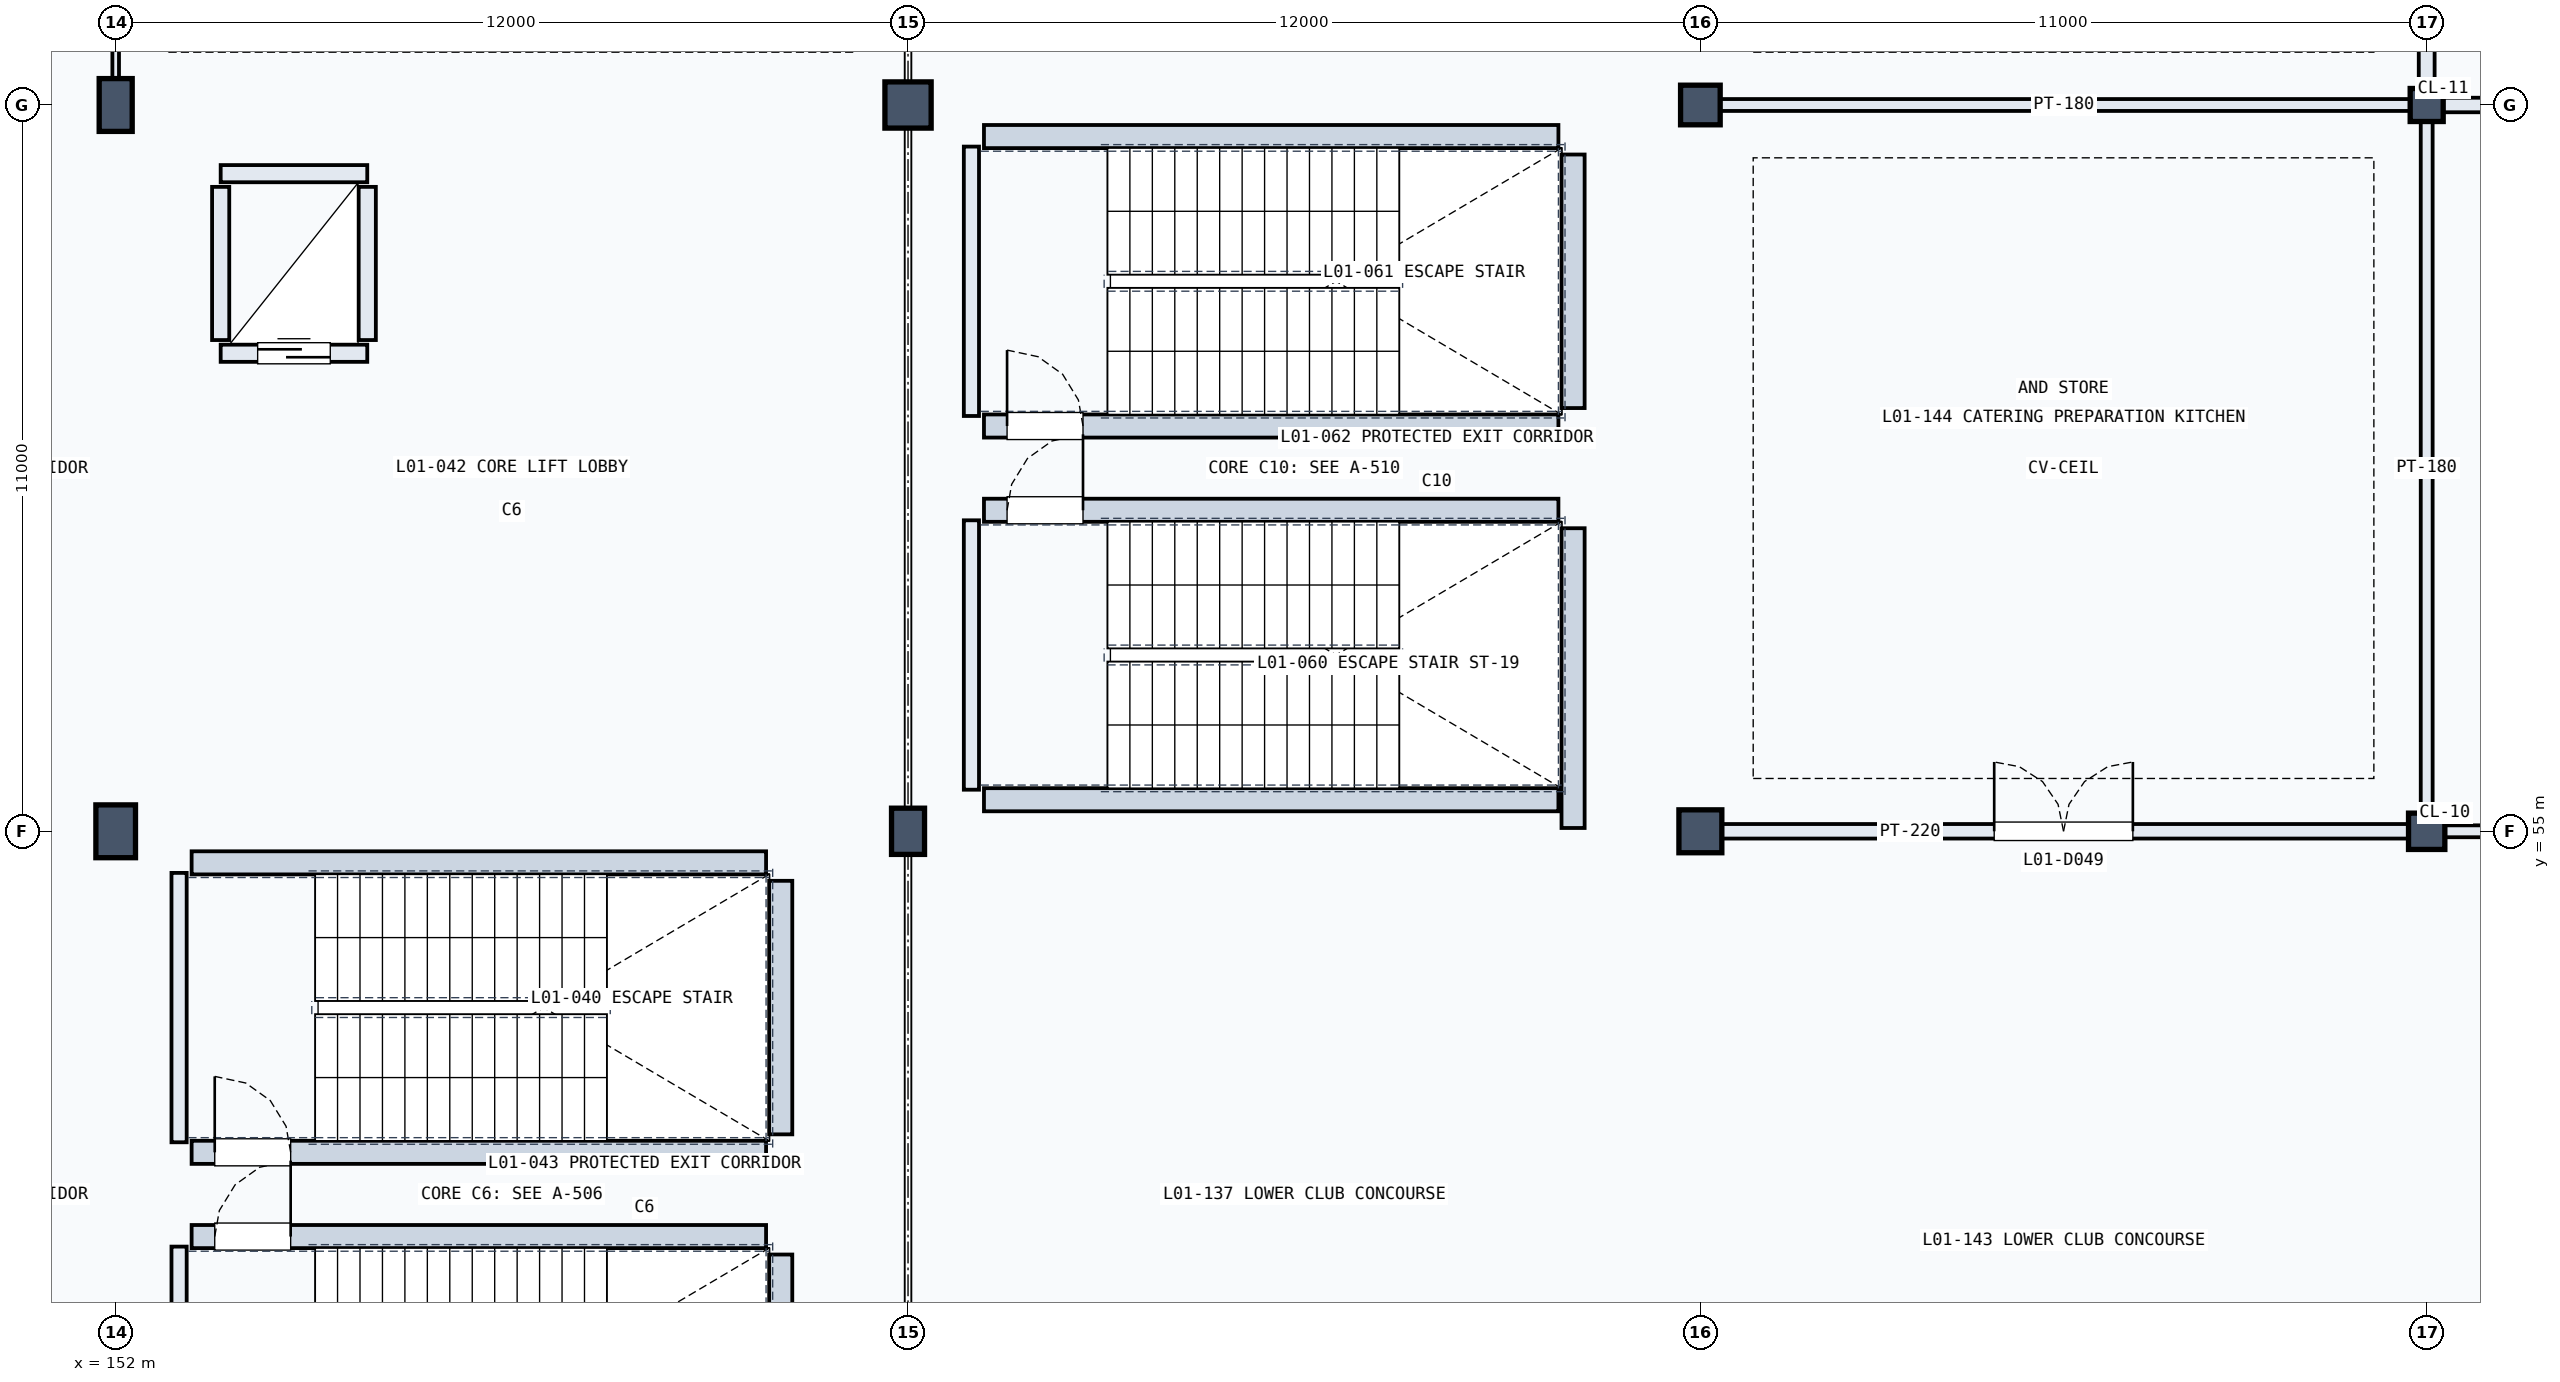
"""IFC4 building model, lengths in metres.
Left out: names, types, materials, properties, quantities, classifications, styles, units other than length and angle.
Written with IfcOpenShell. Run it as: python <this file> out.ifc"""

import sys

from ifc_helpers import new_model, si_unit, direction, frame, frame_2d, origin, origin_2d, place, context, subcontext, project, spatial, rectangle, extrude, element, fill, save


model = new_model("IFC4")
c1 = context("Model", 3, precision=1e-05, world=origin(), true_north=direction((0.0, 1.0)))
c2 = subcontext(c1, "Body", "Model", "MODEL_VIEW")
j1 = project(units=[si_unit("LENGTHUNIT", "METRE"), si_unit("PLANEANGLEUNIT", "RADIAN")], contexts=[c1])
p1 = place(None, origin())
s1 = spatial("IfcSite", under=j1, at=p1, CompositionType="ELEMENT")
p2 = place(p1, origin())
s2 = spatial("IfcBuilding", under=s1, at=p2, CompositionType="ELEMENT")
p3 = place(p2, frame((0.0, 0.0, 5.4)))
s3 = spatial("IfcBuildingStorey", under=s2, at=p3, CompositionType="ELEMENT", Elevation=5.4)
p4 = place(p3, frame((152.0, 55.0, 0.0), z_axis=(0.0, 0.0, 1.0), x_axis=(1.0, 0.0, 0.0)))
e1 = element("IfcColumn", 1, at=p4, inside=s3, PredefinedType="COLUMN", context=c2, shape_type="SweptSolid", body=[
    extrude(rectangle(XDim=0.6, YDim=0.8, at=origin_2d()), origin(), (0.0, 0.0, 1.0), 4.8),
])
p5 = place(p3, frame((152.0, 66.0, 0.0), z_axis=(0.0, 0.0, 1.0), x_axis=(1.0, 0.0, 0.0)))
e2 = element("IfcColumn", 2, at=p5, inside=s3, PredefinedType="COLUMN", context=c2, shape_type="SweptSolid", body=[
    extrude(rectangle(XDim=0.5, YDim=0.8, at=origin_2d()), origin(), (0.0, 0.0, 1.0), 4.8),
])
p6 = place(p3, frame((164.0, 55.0, 0.0), z_axis=(0.0, 0.0, 1.0), x_axis=(1.0, 0.0, 0.0)))
e3 = element("IfcColumn", 3, at=p6, inside=s3, PredefinedType="COLUMN", context=c2, shape_type="SweptSolid", body=[
    extrude(rectangle(XDim=0.5, YDim=0.7, at=origin_2d()), origin(), (0.0, 0.0, 1.0), 4.8),
])
p7 = place(p3, frame((164.0, 66.0, 0.0), z_axis=(0.0, 0.0, 1.0), x_axis=(1.0, 0.0, 0.0)))
e4 = element("IfcColumn", 4, at=p7, inside=s3, PredefinedType="COLUMN", context=c2, shape_type="SweptSolid", body=[
    extrude(rectangle(XDim=0.7, YDim=0.7, at=origin_2d()), origin(), (0.0, 0.0, 1.0), 4.8),
])
p8 = place(p3, frame((176.0, 55.0, 0.0), z_axis=(0.0, 0.0, 1.0), x_axis=(1.0, 0.0, 0.0)))
e5 = element("IfcColumn", 5, at=p8, inside=s3, PredefinedType="COLUMN", context=c2, shape_type="SweptSolid", body=[
    extrude(rectangle(XDim=0.65, YDim=0.65, at=origin_2d()), origin(), (0.0, 0.0, 1.0), 4.8),
])
p9 = place(p3, frame((176.0, 66.0, 0.0), z_axis=(0.0, 0.0, 1.0), x_axis=(1.0, 0.0, 0.0)))
e6 = element("IfcColumn", 6, at=p9, inside=s3, PredefinedType="COLUMN", context=c2, shape_type="SweptSolid", body=[
    extrude(rectangle(XDim=0.6, YDim=0.6, at=origin_2d()), origin(), (0.0, 0.0, 1.0), 4.8),
])
p10 = place(p3, frame((187.0, 55.0, 0.0), z_axis=(0.0, 0.0, 1.0), x_axis=(1.0, 0.0, 0.0)))
e7 = element("IfcColumn", 7, at=p10, inside=s3, PredefinedType="COLUMN", context=c2, shape_type="SweptSolid", body=[
    extrude(rectangle(XDim=0.55, YDim=0.55, at=origin_2d()), origin(), (0.0, 0.0, 1.0), 4.8),
])
p11 = place(p3, frame((187.0, 66.0, 0.0), z_axis=(0.0, 0.0, 1.0), x_axis=(1.0, 0.0, 0.0)))
e8 = element("IfcColumn", 8, at=p11, inside=s3, PredefinedType="COLUMN", context=c2, shape_type="SweptSolid", body=[
    extrude(rectangle(XDim=0.5, YDim=0.5, at=origin_2d()), origin(), (0.0, 0.0, 1.0), 4.8),
])
p12 = place(p3, frame((152.96, 44.63, 0.0), z_axis=(0.0, 0.0, 1.0), x_axis=(0.0, 1.0, 0.0)))
e9 = element("IfcWall", 9, at=p12, inside=s3, PredefinedType="SOLIDWALL", context=c2, shape_type="SweptSolid", body=[
    extrude(rectangle(XDim=4.08, YDim=0.23, at=frame_2d((2.04, 0.0))), origin(), (0.0, 0.0, 1.0), 4.46),
])
p13 = place(p3, frame((162.072, 44.05, 0.0), z_axis=(0.0, 0.0, 1.0), x_axis=(0.0, 1.0, 0.0)))
e10 = element("IfcWall", 10, at=p13, inside=s3, PredefinedType="SOLIDWALL", context=c2, shape_type="SweptSolid", body=[
    extrude(rectangle(XDim=4.54, YDim=0.35, at=frame_2d((2.27, 0.0))), origin(), (0.0, 0.0, 1.0), 4.46),
])
p14 = place(p3, frame((153.15, 48.862, 0.0), z_axis=(0.0, 0.0, 1.0), x_axis=(1.0, 0.0, 0.0)))
e11 = element("IfcWall", 11, at=p14, inside=s3, PredefinedType="SOLIDWALL", context=c2, shape_type="SweptSolid", body=[
    extrude(rectangle(XDim=8.7, YDim=0.35, at=frame_2d((4.35, 0.0))), origin(), (0.0, 0.0, 1.0), 4.46),
])
p15 = place(p14, frame((0.35, 0.0, 0.0)))
e12 = element("IfcOpeningElement", 12, at=p15, cuts=e11, PredefinedType="OPENING", context=c2, shape_type="SweptSolid", body=[
    extrude(rectangle(XDim=1.15, YDim=2.2, at=frame_2d((0.575, 1.1))), frame((0.0, 0.185, 0.0), z_axis=(0.0, -1.0, 0.0), x_axis=(1.0, 0.0, 0.0)), (0.0, 0.0, 1.0), 0.37),
])
p16 = place(p3, frame((152.96, 50.29, 0.0), z_axis=(0.0, 0.0, 1.0), x_axis=(0.0, 1.0, 0.0)))
e13 = element("IfcWall", 13, at=p16, inside=s3, PredefinedType="SOLIDWALL", context=c2, shape_type="SweptSolid", body=[
    extrude(rectangle(XDim=4.08, YDim=0.23, at=frame_2d((2.04, 0.0))), origin(), (0.0, 0.0, 1.0), 4.46),
])
p17 = place(p3, frame((162.072, 50.41, 0.0), z_axis=(0.0, 0.0, 1.0), x_axis=(0.0, 1.0, 0.0)))
e14 = element("IfcWall", 14, at=p17, inside=s3, PredefinedType="SOLIDWALL", context=c2, shape_type="SweptSolid", body=[
    extrude(rectangle(XDim=3.84, YDim=0.35, at=frame_2d((1.92, 0.0))), origin(), (0.0, 0.0, 1.0), 4.46),
])
p18 = place(p3, frame((153.15, 50.138, 0.0), z_axis=(0.0, 0.0, 1.0), x_axis=(1.0, 0.0, 0.0)))
e15 = element("IfcWall", 15, at=p18, inside=s3, PredefinedType="SOLIDWALL", context=c2, shape_type="SweptSolid", body=[
    extrude(rectangle(XDim=8.7, YDim=0.35, at=frame_2d((4.35, 0.0))), origin(), (0.0, 0.0, 1.0), 4.46),
])
p19 = place(p18, frame((0.35, 0.0, 0.0)))
e16 = element("IfcOpeningElement", 16, at=p19, cuts=e15, PredefinedType="OPENING", context=c2, shape_type="SweptSolid", body=[
    extrude(rectangle(XDim=1.15, YDim=2.2, at=frame_2d((0.575, 1.1))), frame((0.0, 0.185, 0.0), z_axis=(0.0, -1.0, 0.0), x_axis=(1.0, 0.0, 0.0)), (0.0, 0.0, 1.0), 0.37),
])
p20 = place(p3, frame((153.15, 54.522, 0.0), z_axis=(0.0, 0.0, 1.0), x_axis=(1.0, 0.0, 0.0)))
e17 = element("IfcWall", 17, at=p20, inside=s3, PredefinedType="SOLIDWALL", context=c2, shape_type="SweptSolid", body=[
    extrude(rectangle(XDim=8.7, YDim=0.35, at=frame_2d((4.35, 0.0))), origin(), (0.0, 0.0, 1.0), 4.46),
])
p21 = place(p3, frame((153.59, 62.24, 0.0), z_axis=(0.0, 0.0, 1.0), x_axis=(1.0, 0.0, 0.0)))
e18 = element("IfcWall", 18, at=p21, inside=s3, PredefinedType="SOLIDWALL", context=c2, shape_type="SweptSolid", body=[
    extrude(rectangle(XDim=2.22, YDim=0.26, at=frame_2d((1.11, 0.0))), origin(), (0.0, 0.0, 1.0), 4.46),
])
p22 = place(p21, frame((0.56, 0.0, 0.0)))
e19 = element("IfcOpeningElement", 19, at=p22, cuts=e18, PredefinedType="OPENING", context=c2, shape_type="SweptSolid", body=[
    extrude(rectangle(XDim=1.1, YDim=2.15, at=frame_2d((0.55, 1.075))), frame((0.0, 0.14, 0.0), z_axis=(0.0, -1.0, 0.0), x_axis=(1.0, 0.0, 0.0)), (0.0, 0.0, 1.0), 0.28),
])
p23 = place(p3, frame((153.59, 64.96, 0.0), z_axis=(0.0, 0.0, 1.0), x_axis=(1.0, 0.0, 0.0)))
e20 = element("IfcWall", 20, at=p23, inside=s3, PredefinedType="SOLIDWALL", context=c2, shape_type="SweptSolid", body=[
    extrude(rectangle(XDim=2.22, YDim=0.26, at=frame_2d((1.11, 0.0))), origin(), (0.0, 0.0, 1.0), 4.46),
])
for number, where, z_axis, x_axis in (
    (21, (153.59, 62.44, 0.0), (0.0, 0.0, 1.0), (0.0, 1.0, 0.0)),
    (22, (155.81, 62.44, 0.0), (0.0, 0.0, 1.0), (0.0, 1.0, 0.0)),
):
    element("IfcWall", number, at=place(p3, frame(where, z_axis=z_axis, x_axis=x_axis)), inside=s3, PredefinedType="SOLIDWALL", context=c2, shape_type="SweptSolid", body=[
        extrude(rectangle(XDim=2.32, YDim=0.26, at=frame_2d((1.16, 0.0))), origin(), (0.0, 0.0, 1.0), 4.46),
    ])
p24 = place(p3, frame((164.96, 55.63, 0.0), z_axis=(0.0, 0.0, 1.0), x_axis=(0.0, 1.0, 0.0)))
e23 = element("IfcWall", 23, at=p24, inside=s3, PredefinedType="SOLIDWALL", context=c2, shape_type="SweptSolid", body=[
    extrude(rectangle(XDim=4.08, YDim=0.23, at=frame_2d((2.04, 0.0))), origin(), (0.0, 0.0, 1.0), 3.79),
])
p25 = place(p3, frame((174.072, 55.05, 0.0), z_axis=(0.0, 0.0, 1.0), x_axis=(0.0, 1.0, 0.0)))
e24 = element("IfcWall", 24, at=p25, inside=s3, PredefinedType="SOLIDWALL", context=c2, shape_type="SweptSolid", body=[
    extrude(rectangle(XDim=4.54, YDim=0.35, at=frame_2d((2.27, 0.0))), origin(), (0.0, 0.0, 1.0), 4.46),
])
p26 = place(p3, frame((165.15, 55.478, 0.0), z_axis=(0.0, 0.0, 1.0), x_axis=(1.0, 0.0, 0.0)))
e25 = element("IfcWall", 25, at=p26, inside=s3, PredefinedType="SOLIDWALL", context=c2, shape_type="SweptSolid", body=[
    extrude(rectangle(XDim=8.7, YDim=0.35, at=frame_2d((4.35, 0.0))), origin(), (0.0, 0.0, 1.0), 4.46),
])
p27 = place(p3, frame((165.15, 59.862, 0.0), z_axis=(0.0, 0.0, 1.0), x_axis=(1.0, 0.0, 0.0)))
e26 = element("IfcWall", 26, at=p27, inside=s3, PredefinedType="SOLIDWALL", context=c2, shape_type="SweptSolid", body=[
    extrude(rectangle(XDim=8.7, YDim=0.35, at=frame_2d((4.35, 0.0))), origin(), (0.0, 0.0, 1.0), 4.46),
])
p28 = place(p27, frame((0.35, 0.0, 0.0)))
e27 = element("IfcOpeningElement", 27, at=p28, cuts=e26, PredefinedType="OPENING", context=c2, shape_type="SweptSolid", body=[
    extrude(rectangle(XDim=1.15, YDim=2.2, at=frame_2d((0.575, 1.1))), frame((0.0, 0.185, 0.0), z_axis=(0.0, -1.0, 0.0), x_axis=(1.0, 0.0, 0.0)), (0.0, 0.0, 1.0), 0.37),
])
p29 = place(p3, frame((164.96, 61.29, 0.0), z_axis=(0.0, 0.0, 1.0), x_axis=(0.0, 1.0, 0.0)))
e28 = element("IfcWall", 28, at=p29, inside=s3, PredefinedType="SOLIDWALL", context=c2, shape_type="SweptSolid", body=[
    extrude(rectangle(XDim=4.08, YDim=0.23, at=frame_2d((2.04, 0.0))), origin(), (0.0, 0.0, 1.0), 3.79),
])
p30 = place(p3, frame((174.072, 61.41, 0.0), z_axis=(0.0, 0.0, 1.0), x_axis=(0.0, 1.0, 0.0)))
e29 = element("IfcWall", 29, at=p30, inside=s3, PredefinedType="SOLIDWALL", context=c2, shape_type="SweptSolid", body=[
    extrude(rectangle(XDim=3.84, YDim=0.35, at=frame_2d((1.92, 0.0))), origin(), (0.0, 0.0, 1.0), 4.46),
])
p31 = place(p3, frame((165.15, 61.138, 0.0), z_axis=(0.0, 0.0, 1.0), x_axis=(1.0, 0.0, 0.0)))
e30 = element("IfcWall", 30, at=p31, inside=s3, PredefinedType="SOLIDWALL", context=c2, shape_type="SweptSolid", body=[
    extrude(rectangle(XDim=8.7, YDim=0.35, at=frame_2d((4.35, 0.0))), origin(), (0.0, 0.0, 1.0), 4.46),
])
p32 = place(p31, frame((0.35, 0.0, 0.0)))
e31 = element("IfcOpeningElement", 31, at=p32, cuts=e30, PredefinedType="OPENING", context=c2, shape_type="SweptSolid", body=[
    extrude(rectangle(XDim=1.15, YDim=2.2, at=frame_2d((0.575, 1.1))), frame((0.0, 0.185, 0.0), z_axis=(0.0, -1.0, 0.0), x_axis=(1.0, 0.0, 0.0)), (0.0, 0.0, 1.0), 0.37),
])
p33 = place(p3, frame((165.15, 65.522, 0.0), z_axis=(0.0, 0.0, 1.0), x_axis=(1.0, 0.0, 0.0)))
e32 = element("IfcWall", 32, at=p33, inside=s3, PredefinedType="SOLIDWALL", context=c2, shape_type="SweptSolid", body=[
    extrude(rectangle(XDim=8.7, YDim=0.35, at=frame_2d((4.35, 0.0))), origin(), (0.0, 0.0, 1.0), 4.46),
])
p34 = place(p3, frame((152.0, 66.22, 0.0), z_axis=(0.0, 0.0, 1.0), x_axis=(0.0, 1.0, 0.0)))
e33 = element("IfcWall", 33, at=p34, inside=s3, PredefinedType="PARTITIONING", context=c2, shape_type="SweptSolid", body=[
    extrude(rectangle(XDim=10.56, YDim=0.1, at=frame_2d((5.28, 0.0))), origin(), (0.0, 0.0, 1.0), 3.49),
])
p35 = place(p34, frame((4.305, 0.0, 0.0)))
e34 = element("IfcOpeningElement", 34, at=p35, cuts=e33, PredefinedType="OPENING", context=c2, shape_type="SweptSolid", body=[
    extrude(rectangle(XDim=1.95, YDim=2.4, at=frame_2d((0.975, 1.2))), frame((0.0, 0.06, 0.0), z_axis=(0.0, -1.0, 0.0), x_axis=(1.0, 0.0, 0.0)), (0.0, 0.0, 1.0), 0.12),
])
p36 = place(p3, frame((176.22, 55.0, 0.0), z_axis=(0.0, 0.0, 1.0), x_axis=(1.0, 0.0, 0.0)))
e35 = element("IfcWall", 35, at=p36, inside=s3, PredefinedType="PARTITIONING", context=c2, shape_type="SweptSolid", body=[
    extrude(rectangle(XDim=10.56, YDim=0.22, at=frame_2d((5.28, 0.0))), origin(), (0.0, 0.0, 1.0), 3.59),
])
p37 = place(p36, frame((4.23, 0.0, 0.0)))
e36 = element("IfcOpeningElement", 36, at=p37, cuts=e35, PredefinedType="OPENING", context=c2, shape_type="SweptSolid", body=[
    extrude(rectangle(XDim=2.1, YDim=2.2, at=frame_2d((1.05, 1.1))), frame((0.0, 0.12, 0.0), z_axis=(0.0, -1.0, 0.0), x_axis=(1.0, 0.0, 0.0)), (0.0, 0.0, 1.0), 0.24),
])
p38 = place(p3, frame((187.22, 55.0, 0.0), z_axis=(0.0, 0.0, 1.0), x_axis=(1.0, 0.0, 0.0)))
e37 = element("IfcWall", 37, at=p38, inside=s3, PredefinedType="PARTITIONING", context=c2, shape_type="SweptSolid", body=[
    extrude(rectangle(XDim=10.3, YDim=0.18, at=frame_2d((5.15, 0.0))), origin(), (0.0, 0.0, 1.0), 3.64),
])
p39 = place(p38, frame((4.225, 0.0, 0.0)))
e38 = element("IfcOpeningElement", 38, at=p39, cuts=e37, PredefinedType="OPENING", context=c2, shape_type="SweptSolid", body=[
    extrude(rectangle(XDim=1.85, YDim=2.35, at=frame_2d((0.925, 1.175))), frame((0.0, 0.1, 0.0), z_axis=(0.0, -1.0, 0.0), x_axis=(1.0, 0.0, 0.0)), (0.0, 0.0, 1.0), 0.2),
])
p40 = place(p3, frame((176.22, 66.0, 0.0), z_axis=(0.0, 0.0, 1.0), x_axis=(1.0, 0.0, 0.0)))
e39 = element("IfcWall", 39, at=p40, inside=s3, PredefinedType="PARTITIONING", context=c2, shape_type="SweptSolid", body=[
    extrude(rectangle(XDim=10.57, YDim=0.18, at=frame_2d((5.285, 0.0))), origin(), (0.0, 0.0, 1.0), 3.69),
])
p41 = place(p3, frame((187.0, 55.22, 0.0), z_axis=(0.0, 0.0, 1.0), x_axis=(0.0, 1.0, 0.0)))
e40 = element("IfcWall", 40, at=p41, inside=s3, PredefinedType="PARTITIONING", context=c2, shape_type="SweptSolid", body=[
    extrude(rectangle(XDim=10.57, YDim=0.18, at=frame_2d((5.285, 0.0))), origin(), (0.0, 0.0, 1.0), 3.64),
])
p42 = place(p3, frame((187.0, 66.21, 0.0), z_axis=(0.0, 0.0, 1.0), x_axis=(0.0, 1.0, 0.0)))
e41 = element("IfcWall", 41, at=p42, inside=s3, PredefinedType="PARTITIONING", context=c2, shape_type="SweptSolid", body=[
    extrude(rectangle(XDim=10.57, YDim=0.24, at=frame_2d((5.285, 0.0))), origin(), (0.0, 0.0, 1.0), 3.705),
])
p43 = place(p3, frame((187.21, 66.0, 0.0), z_axis=(0.0, 0.0, 1.0), x_axis=(1.0, 0.0, 0.0)))
e42 = element("IfcWall", 42, at=p43, inside=s3, PredefinedType="PARTITIONING", context=c2, shape_type="SweptSolid", body=[
    extrude(rectangle(XDim=10.31, YDim=0.22, at=frame_2d((5.155, 0.0))), origin(), (0.0, 0.0, 1.0), 3.705),
])
p44 = place(p15, origin())
e43 = element("IfcDoor", 43, at=p44, inside=s3, OperationType="SINGLE_SWING_RIGHT", PredefinedType="DOOR", context=c2, shape_type="SweptSolid", body=[
    extrude(rectangle(XDim=1.15, YDim=2.2, at=frame_2d((0.575, 1.1))), frame((0.0, 0.025, 0.0), z_axis=(0.0, -1.0, 0.0), x_axis=(1.0, 0.0, 0.0)), (0.0, 0.0, 1.0), 0.05),
])
fill(e12, e43)
p45 = place(p19, origin())
e44 = element("IfcDoor", 44, at=p45, inside=s3, OperationType="SINGLE_SWING_LEFT", PredefinedType="DOOR", context=c2, shape_type="SweptSolid", body=[
    extrude(rectangle(XDim=1.15, YDim=2.2, at=frame_2d((0.575, 1.1))), frame((0.0, 0.025, 0.0), z_axis=(0.0, -1.0, 0.0), x_axis=(1.0, 0.0, 0.0)), (0.0, 0.0, 1.0), 0.05),
])
fill(e16, e44)
p46 = place(p22, origin())
e45 = element("IfcDoor", 45, at=p46, inside=s3, OperationType="SLIDING_TO_LEFT", PredefinedType="DOOR", context=c2, shape_type="SweptSolid", body=[
    extrude(rectangle(XDim=1.1, YDim=2.15, at=frame_2d((0.55, 1.075))), frame((0.0, 0.025, 0.0), z_axis=(0.0, -1.0, 0.0), x_axis=(1.0, 0.0, 0.0)), (0.0, 0.0, 1.0), 0.05),
])
fill(e19, e45)
p47 = place(p28, origin())
e46 = element("IfcDoor", 46, at=p47, inside=s3, OperationType="SINGLE_SWING_RIGHT", PredefinedType="DOOR", context=c2, shape_type="SweptSolid", body=[
    extrude(rectangle(XDim=1.15, YDim=2.2, at=frame_2d((0.575, 1.1))), frame((0.0, 0.025, 0.0), z_axis=(0.0, -1.0, 0.0), x_axis=(1.0, 0.0, 0.0)), (0.0, 0.0, 1.0), 0.05),
])
fill(e27, e46)
p48 = place(p32, origin())
e47 = element("IfcDoor", 47, at=p48, inside=s3, OperationType="SINGLE_SWING_LEFT", PredefinedType="DOOR", context=c2, shape_type="SweptSolid", body=[
    extrude(rectangle(XDim=1.15, YDim=2.2, at=frame_2d((0.575, 1.1))), frame((0.0, 0.025, 0.0), z_axis=(0.0, -1.0, 0.0), x_axis=(1.0, 0.0, 0.0)), (0.0, 0.0, 1.0), 0.05),
])
fill(e31, e47)
p49 = place(p37, origin())
e48 = element("IfcDoor", 48, at=p49, inside=s3, OperationType="DOUBLE_DOOR_SINGLE_SWING", PredefinedType="DOOR", context=c2, shape_type="SweptSolid", body=[
    extrude(rectangle(XDim=2.1, YDim=2.2, at=frame_2d((1.05, 1.1))), frame((0.0, 0.025, 0.0), z_axis=(0.0, -1.0, 0.0), x_axis=(1.0, 0.0, 0.0)), (0.0, 0.0, 1.0), 0.05),
])
fill(e36, e48)
save(model, sys.argv[1])
